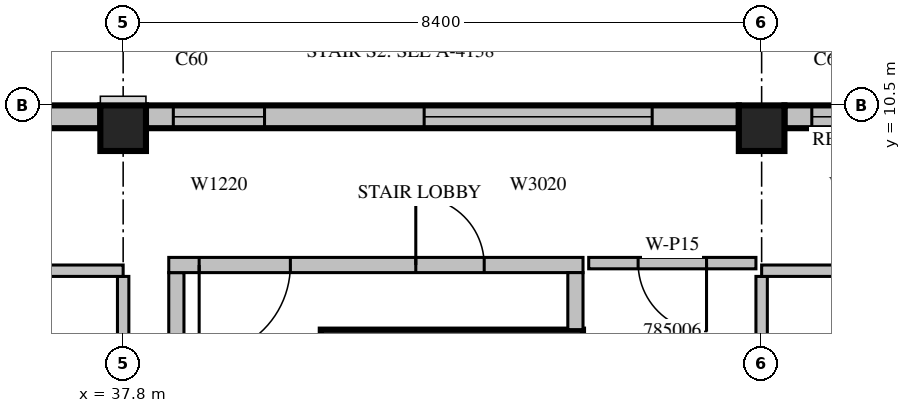
"""IFC4 building model, lengths in metres.
Left out: names, types, materials, properties, quantities, classifications, styles, units other than length and angle.
Written with IfcOpenShell. Run it as: python <this file> out.ifc"""

import sys

from ifc_helpers import new_model, si_unit, direction, frame, frame_2d, origin, origin_2d, place, context, subcontext, project, spatial, rectangle, extrude, source, transform, mapped, element, fill, save


model = new_model("IFC4")
c1 = context("Model", 3, precision=1e-05, world=origin(), true_north=direction((0.0, 1.0)))
c2 = subcontext(c1, "Body", "Model", "MODEL_VIEW")
j1 = project(units=[si_unit("LENGTHUNIT", "METRE"), si_unit("PLANEANGLEUNIT", "RADIAN")], contexts=[c1])
p1 = place(None, origin())
s1 = spatial("IfcSite", under=j1, at=p1, CompositionType="ELEMENT")
p2 = place(p1, origin())
s2 = spatial("IfcBuilding", under=s1, at=p2, CompositionType="ELEMENT")
p3 = place(p2, frame((0.0, 0.0, 358.0)))
s3 = spatial("IfcBuildingStorey", under=s2, at=p3, CompositionType="ELEMENT", Elevation=358.0)
m1 = source(origin(), c2, "Body", "SweptSolid", [
    extrude(rectangle(XDim=0.6, YDim=0.6, at=origin_2d()), origin(), (0.0, 0.0, 1.0), 3.5),
])
for number, where, z_axis, x_axis in (
    (1, (37.8, 10.2, 0.0), (0.0, 0.0, 1.0), (1.0, 0.0, 0.0)),
    (2, (46.2, 10.2, 0.0), (0.0, 0.0, 1.0), (1.0, 0.0, 0.0)),
):
    element("IfcColumn", number, at=place(p3, frame(where, z_axis=z_axis, x_axis=x_axis)), inside=s3, PredefinedType="COLUMN", context=c2, shape_type="MappedRepresentation", body=[
        mapped(m1, transform((0.0, 0.0, 0.0), scale=1.0)),
    ])
m2 = source(origin(), c2, "Body", "SweptSolid", [
    extrude(rectangle(XDim=3.06, YDim=0.3, at=frame_2d((1.53, 0.0))), origin(), (0.0, 0.0, 1.0), 3.1),
])
p4 = place(p3, frame((49.56, 10.35, 0.0), z_axis=(0.0, 0.0, 1.0), x_axis=(-1.0, 0.0, 0.0)))
e3 = element("IfcWall", 3, at=p4, inside=s3, PredefinedType="STANDARD", context=c2, shape_type="MappedRepresentation", body=[
    mapped(m2, transform((0.0, 0.0, 0.0), scale=1.0)),
])
m3 = source(origin(), c2, "Body", "SweptSolid", [
    extrude(rectangle(XDim=1.2, YDim=2.0, at=frame_2d((0.6, 1.0))), frame((0.0, 0.16, 0.0), z_axis=(0.0, -1.0, 0.0), x_axis=(1.0, 0.0, 0.0)), (0.0, 0.0, 1.0), 0.32),
])
p5 = place(p4, frame((1.5, 0.0, 0.6)))
e4 = element("IfcOpeningElement", 4, at=p5, cuts=e3, PredefinedType="OPENING", context=c2, shape_type="MappedRepresentation", body=[
    mapped(m3, transform((0.0, 0.0, 0.0), scale=1.0)),
])
m4 = source(origin(), c2, "Body", "SweptSolid", [
    extrude(rectangle(XDim=7.8, YDim=0.3, at=frame_2d((3.9, 0.0))), origin(), (0.0, 0.0, 1.0), 3.1),
])
p6 = place(p3, frame((45.9, 10.35, 0.0), z_axis=(0.0, 0.0, 1.0), x_axis=(-1.0, 0.0, 0.0)))
e5 = element("IfcWall", 5, at=p6, inside=s3, PredefinedType="STANDARD", context=c2, shape_type="MappedRepresentation", body=[
    mapped(m4, transform((0.0, 0.0, 0.0), scale=1.0)),
])
m5 = source(origin(), c2, "Body", "SweptSolid", [
    extrude(rectangle(XDim=3.0, YDim=2.0, at=frame_2d((1.5, 1.0))), frame((0.0, 0.16, 0.0), z_axis=(0.0, -1.0, 0.0), x_axis=(1.0, 0.0, 0.0)), (0.0, 0.0, 1.0), 0.32),
])
p7 = place(p6, frame((1.14, 0.0, 0.6)))
e6 = element("IfcOpeningElement", 6, at=p7, cuts=e5, PredefinedType="OPENING", context=c2, shape_type="MappedRepresentation", body=[
    mapped(m5, transform((0.0, 0.0, 0.0), scale=1.0)),
])
p8 = place(p6, frame((6.24, 0.0, 0.6)))
e7 = element("IfcOpeningElement", 7, at=p8, cuts=e5, PredefinedType="OPENING", context=c2, shape_type="MappedRepresentation", body=[
    mapped(m3, transform((0.0, 0.0, 0.0), scale=1.0)),
])
p9 = place(p3, frame((37.5, 10.35, 0.0), z_axis=(0.0, 0.0, 1.0), x_axis=(-1.0, 0.0, 0.0)))
e8 = element("IfcWall", 8, at=p9, inside=s3, PredefinedType="STANDARD", context=c2, shape_type="MappedRepresentation", body=[
    mapped(m4, transform((0.0, 0.0, 0.0), scale=1.0)),
])
p10 = place(p9, frame((1.14, 0.0, 0.6)))
e9 = element("IfcOpeningElement", 9, at=p10, cuts=e8, PredefinedType="OPENING", context=c2, shape_type="MappedRepresentation", body=[
    mapped(m5, transform((0.0, 0.0, 0.0), scale=1.0)),
])
p11 = place(p9, frame((6.24, 0.0, 0.6)))
e10 = element("IfcOpeningElement", 10, at=p11, cuts=e8, PredefinedType="OPENING", context=c2, shape_type="MappedRepresentation", body=[
    mapped(m3, transform((0.0, 0.0, 0.0), scale=1.0)),
])
m6 = source(origin(), c2, "Body", "SweptSolid", [
    extrude(rectangle(XDim=3.45, YDim=0.25, at=frame_2d((1.725, 0.0))), origin(), (0.0, 0.0, 1.0), 3.1),
])
p12 = place(p3, frame((40.4, 7.425, 0.0), z_axis=(0.0, 0.0, 1.0), x_axis=(1.0, 0.0, 0.0)))
e11 = element("IfcWall", 11, at=p12, inside=s3, PredefinedType="SOLIDWALL", context=c2, shape_type="MappedRepresentation", body=[
    mapped(m6, transform((0.0, 0.0, 0.0), scale=1.0)),
])
m7 = source(origin(), c2, "Body", "SweptSolid", [
    extrude(rectangle(XDim=8.0, YDim=0.2, at=frame_2d((4.0, 0.0))), origin(), (0.0, 0.0, 1.0), 3.1),
])
p13 = place(p3, frame((38.5, 0.3, 0.0), z_axis=(0.0, 0.0, 1.0), x_axis=(0.0, 1.0, 0.0)))
e12 = element("IfcWall", 12, at=p13, inside=s3, PredefinedType="PARTITIONING", context=c2, shape_type="MappedRepresentation", body=[
    mapped(m7, transform((0.0, 0.0, 0.0), scale=1.0)),
])
m8 = source(origin(), c2, "Body", "SweptSolid", [
    extrude(rectangle(XDim=5.45, YDim=0.2, at=frame_2d((2.725, 0.0))), origin(), (0.0, 0.0, 1.0), 3.1),
])
p14 = place(p3, frame((38.4, 8.4, 0.0), z_axis=(0.0, 0.0, 1.0), x_axis=(1.0, 0.0, 0.0)))
e13 = element("IfcWall", 13, at=p14, inside=s3, PredefinedType="PARTITIONING", context=c2, shape_type="MappedRepresentation", body=[
    mapped(m8, transform((0.0, 0.0, 0.0), scale=1.0)),
])
m9 = source(origin(), c2, "Body", "SweptSolid", [
    extrude(rectangle(XDim=1.2, YDim=2.1, at=frame_2d((0.6, 1.05))), frame((0.0, 0.11, 0.0), z_axis=(0.0, -1.0, 0.0), x_axis=(1.0, 0.0, 0.0)), (0.0, 0.0, 1.0), 0.22),
])
p15 = place(p14, frame((0.4, 0.0, 0.0)))
e14 = element("IfcOpeningElement", 14, at=p15, cuts=e13, PredefinedType="OPENING", context=c2, shape_type="MappedRepresentation", body=[
    mapped(m9, transform((0.0, 0.0, 0.0), scale=1.0)),
])
m10 = source(origin(), c2, "Body", "SweptSolid", [
    extrude(rectangle(XDim=0.9, YDim=2.1, at=frame_2d((0.45, 1.05))), frame((0.0, 0.11, 0.0), z_axis=(0.0, -1.0, 0.0), x_axis=(1.0, 0.0, 0.0)), (0.0, 0.0, 1.0), 0.22),
])
p16 = place(p14, frame((3.25, 0.0, 0.0)))
e15 = element("IfcOpeningElement", 15, at=p16, cuts=e13, PredefinedType="OPENING", context=c2, shape_type="MappedRepresentation", body=[
    mapped(m10, transform((0.0, 0.0, 0.0), scale=1.0)),
])
m11 = source(origin(), c2, "Body", "SweptSolid", [
    extrude(rectangle(XDim=0.75, YDim=0.2, at=frame_2d((0.375, 0.0))), origin(), (0.0, 0.0, 1.0), 3.1),
])
p17 = place(p3, frame((43.75, 7.55, 0.0), z_axis=(0.0, 0.0, 1.0), x_axis=(0.0, 1.0, 0.0)))
e16 = element("IfcWall", 16, at=p17, inside=s3, PredefinedType="PARTITIONING", context=c2, shape_type="MappedRepresentation", body=[
    mapped(m11, transform((0.0, 0.0, 0.0), scale=1.0)),
])
m12 = source(origin(), c2, "Body", "SweptSolid", [
    extrude(rectangle(XDim=2.2, YDim=0.15, at=frame_2d((1.1, 0.0))), origin(), (0.0, 0.0, 1.0), 3.1),
])
p18 = place(p3, frame((46.125, 8.425, 0.0), z_axis=(0.0, 0.0, 1.0), x_axis=(-1.0, 0.0, 0.0)))
e17 = element("IfcWall", 17, at=p18, inside=s3, PredefinedType="PARTITIONING", context=c2, shape_type="MappedRepresentation", body=[
    mapped(m12, transform((0.0, 0.0, 0.0), scale=1.0)),
])
m13 = source(origin(), c2, "Body", "SweptSolid", [
    extrude(rectangle(XDim=0.9, YDim=2.1, at=frame_2d((0.45, 1.05))), frame((0.0, 0.085, 0.0), z_axis=(0.0, -1.0, 0.0), x_axis=(1.0, 0.0, 0.0)), (0.0, 0.0, 1.0), 0.17),
])
p19 = place(p18, frame((0.65, 0.0, 0.0)))
e18 = element("IfcOpeningElement", 18, at=p19, cuts=e17, PredefinedType="OPENING", context=c2, shape_type="MappedRepresentation", body=[
    mapped(m13, transform((0.0, 0.0, 0.0), scale=1.0)),
])
m14 = source(origin(), c2, "Body", "SweptSolid", [
    extrude(rectangle(XDim=3.2, YDim=0.15, at=frame_2d((1.6, 0.0))), origin(), (0.0, 0.0, 1.0), 3.1),
])
for number, where, z_axis, x_axis in (
    (19, (37.8, 5.05, 0.0), (0.0, 0.0, 1.0), (0.0, 1.0, 0.0)),
    (20, (46.2, 5.05, 0.0), (0.0, 0.0, 1.0), (0.0, 1.0, 0.0)),
):
    element("IfcWall", number, at=place(p3, frame(where, z_axis=z_axis, x_axis=x_axis)), inside=s3, PredefinedType="PARTITIONING", context=c2, shape_type="MappedRepresentation", body=[
        mapped(m14, transform((0.0, 0.0, 0.0), scale=1.0)),
    ])
m15 = source(origin(), c2, "Body", "SweptSolid", [
    extrude(rectangle(XDim=8.4, YDim=0.15, at=frame_2d((4.2, 0.0))), origin(), (0.0, 0.0, 1.0), 3.1),
])
p20 = place(p3, frame((37.8, 8.325, 0.0), z_axis=(0.0, 0.0, 1.0), x_axis=(-1.0, 0.0, 0.0)))
e21 = element("IfcWall", 21, at=p20, inside=s3, PredefinedType="PARTITIONING", context=c2, shape_type="MappedRepresentation", body=[
    mapped(m15, transform((0.0, 0.0, 0.0), scale=1.0)),
])
m16 = source(origin(), c2, "Body", "SweptSolid", [
    extrude(rectangle(XDim=1.0, YDim=2.1, at=frame_2d((0.5, 1.05))), frame((0.0, 0.085, 0.0), z_axis=(0.0, -1.0, 0.0), x_axis=(1.0, 0.0, 0.0)), (0.0, 0.0, 1.0), 0.17),
])
p21 = place(p20, frame((3.658, 0.0, 0.0)))
e22 = element("IfcOpeningElement", 22, at=p21, cuts=e21, PredefinedType="OPENING", context=c2, shape_type="MappedRepresentation", body=[
    mapped(m16, transform((0.0, 0.0, 0.0), scale=1.0)),
])
m17 = source(origin(), c2, "Body", "SweptSolid", [
    extrude(rectangle(XDim=3.06, YDim=0.15, at=frame_2d((1.53, 0.0))), origin(), (0.0, 0.0, 1.0), 3.1),
])
p22 = place(p3, frame((49.26, 8.325, 0.0), z_axis=(0.0, 0.0, 1.0), x_axis=(-1.0, 0.0, 0.0)))
e23 = element("IfcWall", 23, at=p22, inside=s3, PredefinedType="PARTITIONING", context=c2, shape_type="MappedRepresentation", body=[
    mapped(m17, transform((0.0, 0.0, 0.0), scale=1.0)),
])
p23 = place(p22, frame((0.993, 0.0, 0.0)))
e24 = element("IfcOpeningElement", 24, at=p23, cuts=e23, PredefinedType="OPENING", context=c2, shape_type="MappedRepresentation", body=[
    mapped(m16, transform((0.0, 0.0, 0.0), scale=1.0)),
])
m18 = source(origin(), c2, "Body", "SweptSolid", [
    extrude(rectangle(XDim=1.2, YDim=2.0, at=frame_2d((0.6, 1.0))), frame((0.0, 0.03, 0.0), z_axis=(0.0, -1.0, 0.0), x_axis=(1.0, 0.0, 0.0)), (0.0, 0.0, 1.0), 0.06),
])
p24 = place(p5, origin())
e25 = element("IfcWindow", 25, at=p24, inside=s3, PartitioningType="SINGLE_PANEL", PredefinedType="WINDOW", context=c2, shape_type="MappedRepresentation", body=[
    mapped(m18, transform((0.0, 0.0, 0.0), scale=1.0)),
])
fill(e4, e25)
m19 = source(origin(), c2, "Body", "SweptSolid", [
    extrude(rectangle(XDim=3.0, YDim=2.0, at=frame_2d((1.5, 1.0))), frame((0.0, 0.03, 0.0), z_axis=(0.0, -1.0, 0.0), x_axis=(1.0, 0.0, 0.0)), (0.0, 0.0, 1.0), 0.06),
])
p25 = place(p7, origin())
e26 = element("IfcWindow", 26, at=p25, inside=s3, PartitioningType="SINGLE_PANEL", PredefinedType="WINDOW", context=c2, shape_type="MappedRepresentation", body=[
    mapped(m19, transform((0.0, 0.0, 0.0), scale=1.0)),
])
fill(e6, e26)
p26 = place(p8, origin())
e27 = element("IfcWindow", 27, at=p26, inside=s3, PartitioningType="SINGLE_PANEL", PredefinedType="WINDOW", context=c2, shape_type="MappedRepresentation", body=[
    mapped(m18, transform((0.0, 0.0, 0.0), scale=1.0)),
])
fill(e7, e27)
m20 = source(origin(), c2, "Body", "SweptSolid", [
    extrude(rectangle(XDim=1.2, YDim=2.1, at=frame_2d((0.6, 1.05))), frame((0.0, 0.025, 0.0), z_axis=(0.0, -1.0, 0.0), x_axis=(1.0, 0.0, 0.0)), (0.0, 0.0, 1.0), 0.05),
])
p27 = place(p15, origin())
e28 = element("IfcDoor", 28, at=p27, inside=s3, OperationType="SINGLE_SWING_RIGHT", PredefinedType="DOOR", context=c2, shape_type="MappedRepresentation", body=[
    mapped(m20, transform((0.0, 0.0, 0.0), scale=1.0)),
])
fill(e14, e28)
m21 = source(origin(), c2, "Body", "SweptSolid", [
    extrude(rectangle(XDim=0.9, YDim=2.1, at=frame_2d((0.45, 1.05))), frame((0.0, 0.025, 0.0), z_axis=(0.0, -1.0, 0.0), x_axis=(1.0, 0.0, 0.0)), (0.0, 0.0, 1.0), 0.05),
])
p28 = place(p16, origin())
e29 = element("IfcDoor", 29, at=p28, inside=s3, OperationType="SINGLE_SWING_LEFT", PredefinedType="DOOR", context=c2, shape_type="MappedRepresentation", body=[
    mapped(m21, transform((0.0, 0.0, 0.0), scale=1.0)),
])
fill(e15, e29)
p29 = place(p19, origin())
e30 = element("IfcDoor", 30, at=p29, inside=s3, OperationType="SINGLE_SWING_LEFT", PredefinedType="DOOR", context=c2, shape_type="MappedRepresentation", body=[
    mapped(m21, transform((0.0, 0.0, 0.0), scale=1.0)),
])
fill(e18, e30)
save(model, sys.argv[1])
